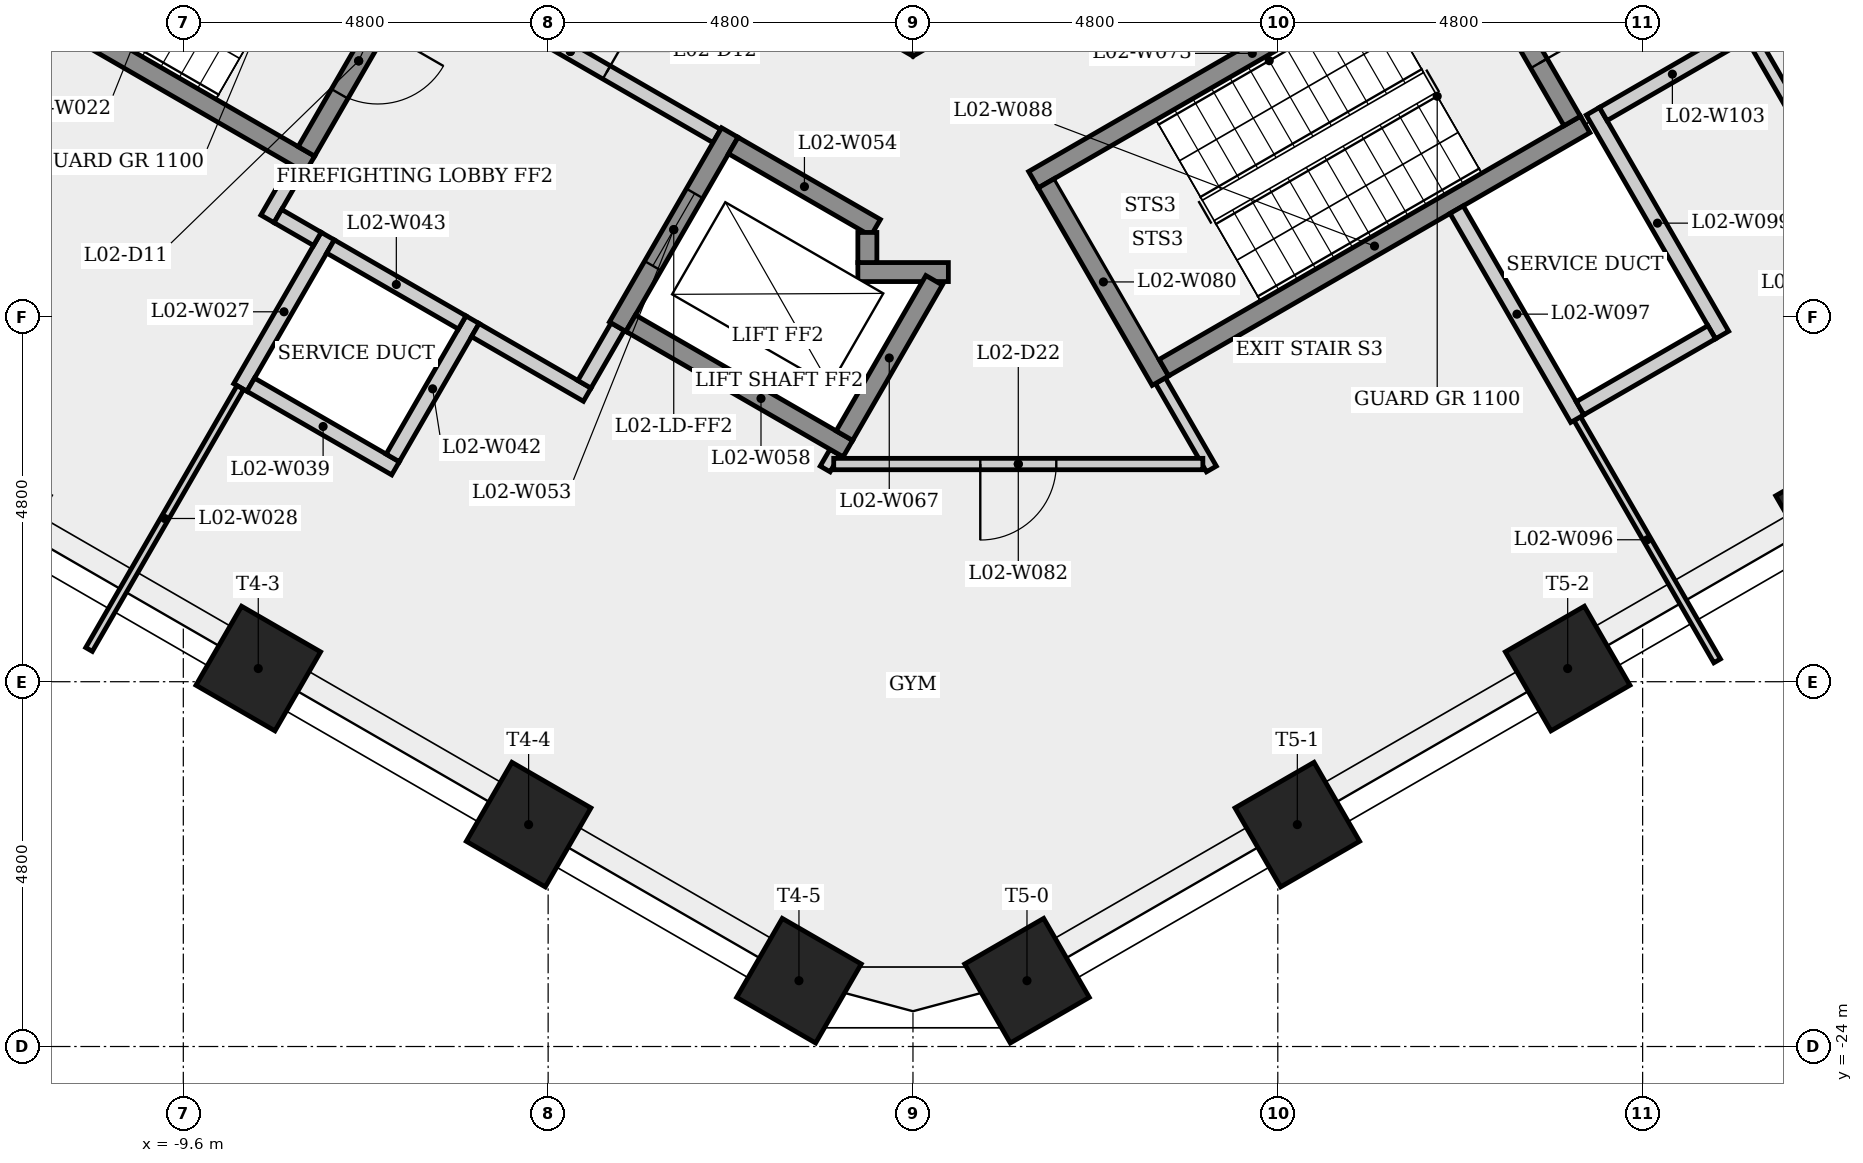
"""IFC4 building model, lengths in metres.
Left out: names, types, materials, properties, quantities, classifications, styles, units other than length and angle.
Written with IfcOpenShell. Run it as: python <this file> out.ifc"""

import sys

from ifc_helpers import new_model, si_unit, direction, frame, frame_2d, origin, origin_2d, place, context, subcontext, project, spatial, rectangle, extrude, element, fill, save


model = new_model("IFC4")
c1 = context("Model", 3, precision=1e-05, world=origin(), true_north=direction((0.0, 1.0)))
c2 = subcontext(c1, "Body", "Model", "MODEL_VIEW")
j1 = project(units=[si_unit("LENGTHUNIT", "METRE"), si_unit("PLANEANGLEUNIT", "RADIAN")], contexts=[c1])
p1 = place(None, origin())
s1 = spatial("IfcSite", under=j1, at=p1, CompositionType="ELEMENT")
p2 = place(p1, origin())
s2 = spatial("IfcBuilding", under=s1, at=p2, CompositionType="ELEMENT")
p3 = place(p2, frame((0.0, 0.0, 11.5)))
s3 = spatial("IfcBuildingStorey", under=s2, at=p3, CompositionType="ELEMENT", Elevation=11.5)
p4 = place(p3, frame((-9.3, -5.138, 0.0), z_axis=(0.0, 0.0, 1.0), x_axis=(0.866023993627, -0.500002442456, 0.0)))
e1 = element("IfcWall", 1, at=p4, inside=s3, PredefinedType="SHEAR", context=c2, shape_type="SweptSolid", body=[
    extrude(rectangle(XDim=10.97, YDim=0.8, at=frame_2d((5.485, 0.0))), origin(), (0.0, 0.0, 1.0), 4.5),
])
p5 = place(p4, frame((5.74, 0.0, 0.0)))
e2 = element("IfcOpeningElement", 2, at=p5, cuts=e1, PredefinedType="OPENING", context=c2, shape_type="SweptSolid", body=[
    extrude(rectangle(XDim=0.9, YDim=2.1, at=frame_2d((0.45, 1.05))), frame((0.0, 0.41, 0.0), z_axis=(0.0, -1.0, 0.0), x_axis=(1.0, 0.0, 0.0)), (0.0, 0.0, 1.0), 0.82),
])
p6 = place(p3, frame((-0.2, -10.623, 0.0), z_axis=(0.0, 0.0, 1.0), x_axis=(0.866023993627, 0.500002442456, 0.0)))
e3 = element("IfcWall", 3, at=p6, inside=s3, PredefinedType="SHEAR", context=c2, shape_type="SweptSolid", body=[
    extrude(rectangle(XDim=10.97, YDim=0.8, at=frame_2d((5.485, 0.0))), origin(), (0.0, 0.0, 1.0), 4.5),
])
p7 = place(p6, frame((7.224, 0.0, 0.0)))
e4 = element("IfcOpeningElement", 4, at=p7, cuts=e3, PredefinedType="OPENING", context=c2, shape_type="SweptSolid", body=[
    extrude(rectangle(XDim=0.9, YDim=2.1, at=frame_2d((0.45, 1.05))), frame((0.0, 0.41, 0.0), z_axis=(0.0, -1.0, 0.0), x_axis=(1.0, 0.0, 0.0)), (0.0, 0.0, 1.0), 0.82),
])
for number, where, z_axis, x_axis in (
    (5, (-8.614, -19.027, 0.0), (0.0, 0.0, 1.0), (-0.5, -0.866, 0.0)),
    (6, (-5.057, -21.08, 0.0), (0.0, 0.0, 1.0), (-0.5, -0.866, 0.0)),
    (7, (-1.5, -23.134, 0.0), (0.0, 0.0, 1.0), (-0.5, -0.866, 0.0)),
    (8, (1.5, -23.134, 0.0), (0.0, 0.0, 1.0), (0.5, -0.866, 0.0)),
    (9, (5.057, -21.08, 0.0), (0.0, 0.0, 1.0), (0.5, -0.866, 0.0)),
    (10, (8.614, -19.027, 0.0), (0.0, 0.0, 1.0), (0.5, -0.866, 0.0)),
    (11, (12.171, -16.973, 0.0), (0.0, 0.0, 1.0), (0.5, -0.866, 0.0)),
):
    element("IfcColumn", number, at=place(p3, frame(where, z_axis=z_axis, x_axis=x_axis)), inside=s3, PredefinedType="COLUMN", context=c2, shape_type="SweptSolid", body=[
        extrude(rectangle(XDim=1.2, YDim=1.2, at=origin_2d()), origin(), (0.0, 0.0, 1.0), 4.5),
    ])
p8 = place(p3, frame((-8.85, -15.329, 0.0), z_axis=(0.0, 0.0, 1.0), x_axis=(0.500077740698, 0.865980515519, 0.0)))
e12 = element("IfcWall", 12, at=p8, inside=s3, PredefinedType="PLUMBINGWALL", context=c2, shape_type="SweptSolid", body=[
    extrude(rectangle(XDim=2.3, YDim=0.2, at=frame_2d((1.15, 0.0))), origin(), (0.0, 0.0, 1.0), 4.1),
])
p9 = place(p3, frame((-8.85, -15.329, 0.0), z_axis=(0.0, 0.0, 1.0), x_axis=(-0.499991453095, -0.866030338286, 0.0)))
e13 = element("IfcWall", 13, at=p9, inside=s3, PredefinedType="PARTITIONING", context=c2, shape_type="SweptSolid", body=[
    extrude(rectangle(XDim=3.98, YDim=0.1, at=frame_2d((1.99, 0.0))), origin(), (0.0, 0.0, 1.0), 4.1),
])
p10 = place(p3, frame((-8.493, -13.11, 0.0), z_axis=(0.0, 0.0, 1.0), x_axis=(0.500067724834, 0.865986299303, 0.0)))
e14 = element("IfcWall", 14, at=p10, inside=s3, PredefinedType="PARTITIONING", context=c2, shape_type="SweptSolid", body=[
    extrude(rectangle(XDim=0.775, YDim=0.2, at=frame_2d((0.388, 0.0))), origin(), (0.0, 0.0, 1.0), 4.1),
])
p11 = place(p3, frame((-7.935, -12.393, 0.0), z_axis=(0.0, 0.0, 1.0), x_axis=(-0.866025499775, 0.499999833739, 0.0)))
e15 = element("IfcWall", 15, at=p11, inside=s3, PredefinedType="SHEAR", context=c2, shape_type="SweptSolid", body=[
    extrude(rectangle(XDim=6.4, YDim=0.25, at=frame_2d((3.2, 0.0))), origin(), (0.0, 0.0, 1.0), 4.1),
])
p12 = place(p3, frame((-7.836, -13.373, 0.0), z_axis=(0.0, 0.0, 1.0), x_axis=(-0.866232998003, 0.499640263761, 0.0)))
e16 = element("IfcWall", 16, at=p12, inside=s3, PredefinedType="PARTITIONING", context=c2, shape_type="SweptSolid", body=[
    extrude(rectangle(XDim=0.6, YDim=0.2, at=frame_2d((0.3, 0.0))), origin(), (0.0, 0.0, 1.0), 4.1),
])
p13 = place(p3, frame((-6.808, -16.392, 0.0), z_axis=(0.0, 0.0, 1.0), x_axis=(-0.866008176907, 0.50002983664, 0.0)))
e17 = element("IfcWall", 17, at=p13, inside=s3, PredefinedType="PLUMBINGWALL", context=c2, shape_type="SweptSolid", body=[
    extrude(rectangle(XDim=2.2, YDim=0.2, at=frame_2d((1.1, 0.0))), origin(), (0.0, 0.0, 1.0), 4.1),
])
p14 = place(p3, frame((-6.605, -9.841, 0.0), z_axis=(0.0, 0.0, 1.0), x_axis=(-0.499996545922, -0.866027397988, 0.0)))
e18 = element("IfcWall", 18, at=p14, inside=s3, PredefinedType="SHEAR", context=c2, shape_type="SweptSolid", body=[
    extrude(rectangle(XDim=2.75, YDim=0.25, at=frame_2d((1.375, 0.0))), origin(), (0.0, 0.0, 1.0), 4.1),
])
p15 = place(p14, frame((0.875, 0.0, 0.0)))
e19 = element("IfcOpeningElement", 19, at=p15, cuts=e18, PredefinedType="OPENING", context=c2, shape_type="SweptSolid", body=[
    extrude(rectangle(XDim=1.0, YDim=2.1, at=frame_2d((0.5, 1.05))), frame((0.0, 0.135, 0.0), z_axis=(0.0, -1.0, 0.0), x_axis=(1.0, 0.0, 0.0)), (0.0, 0.0, 1.0), 0.27),
])
p16 = place(p3, frame((-6.435, -9.795, 0.0), z_axis=(0.0, 0.0, 1.0), x_axis=(0.866012907634, -0.500021643343, 0.0)))
e20 = element("IfcWall", 20, at=p16, inside=s3, PredefinedType="PARTITIONING", context=c2, shape_type="SweptSolid", body=[
    extrude(rectangle(XDim=4.45, YDim=0.2, at=frame_2d((2.225, 0.0))), origin(), (0.0, 0.0, 1.0), 4.1),
])
p17 = place(p16, frame((1.675, 0.0, 0.0)))
e21 = element("IfcOpeningElement", 21, at=p17, cuts=e20, PredefinedType="OPENING", context=c2, shape_type="SweptSolid", body=[
    extrude(rectangle(XDim=1.1, YDim=2.1, at=frame_2d((0.55, 1.05))), frame((0.0, 0.11, 0.0), z_axis=(0.0, -1.0, 0.0), x_axis=(1.0, 0.0, 0.0)), (0.0, 0.0, 1.0), 0.22),
])
p18 = place(p3, frame((-5.795, -14.437, 0.0), z_axis=(0.0, 0.0, 1.0), x_axis=(-0.500027713859, -0.866009402589, 0.0)))
e22 = element("IfcWall", 22, at=p18, inside=s3, PredefinedType="PLUMBINGWALL", context=c2, shape_type="SweptSolid", body=[
    extrude(rectangle(XDim=2.1, YDim=0.2, at=frame_2d((1.05, 0.0))), origin(), (0.0, 0.0, 1.0), 4.1),
])
p19 = place(p3, frame((-5.931, -14.473, 0.0), z_axis=(0.0, 0.0, 1.0), x_axis=(-0.866041268327, 0.499972520799, 0.0)))
e23 = element("IfcWall", 23, at=p19, inside=s3, PredefinedType="PLUMBINGWALL", context=c2, shape_type="SweptSolid", body=[
    extrude(rectangle(XDim=2.0, YDim=0.2, at=frame_2d((1.0, 0.0))), origin(), (0.0, 0.0, 1.0), 4.1),
])
p20 = place(p3, frame((-4.286, -15.423, 0.0), z_axis=(0.0, 0.0, 1.0), x_axis=(-0.866025371046, 0.500000056704, 0.0)))
e24 = element("IfcWall", 24, at=p20, inside=s3, PredefinedType="PARTITIONING", context=c2, shape_type="SweptSolid", body=[
    extrude(rectangle(XDim=1.7, YDim=0.2, at=frame_2d((0.85, 0.0))), origin(), (0.0, 0.0, 1.0), 4.1),
])
p21 = place(p3, frame((-3.885, -14.529, 0.0), z_axis=(0.0, 0.0, 1.0), x_axis=(-0.499859285417, -0.866106630146, 0.0)))
e25 = element("IfcWall", 25, at=p21, inside=s3, PredefinedType="PARTITIONING", context=c2, shape_type="SweptSolid", body=[
    extrude(rectangle(XDim=0.875, YDim=0.2, at=frame_2d((0.438, 0.0))), origin(), (0.0, 0.0, 1.0), 4.1),
])
p22 = place(p3, frame((-2.41, -11.974, 0.0), z_axis=(0.0, 0.0, 1.0), x_axis=(-0.500001826776, -0.866024349092, 0.0)))
e26 = element("IfcWall", 26, at=p22, inside=s3, PredefinedType="SHEAR", context=c2, shape_type="SweptSolid", body=[
    extrude(rectangle(XDim=2.95, YDim=0.25, at=frame_2d((1.475, 0.0))), origin(), (0.0, 0.0, 1.0), 4.1),
])
p23 = place(p22, frame((0.925, 0.0, 0.0)))
e27 = element("IfcOpeningElement", 27, at=p23, cuts=e26, PredefinedType="OPENING", context=c2, shape_type="SweptSolid", body=[
    extrude(rectangle(XDim=1.1, YDim=2.1, at=frame_2d((0.55, 1.05))), frame((0.0, 0.135, 0.0), z_axis=(0.0, -1.0, 0.0), x_axis=(1.0, 0.0, 0.0)), (0.0, 0.0, 1.0), 0.27),
])
p24 = place(p3, frame((-2.364, -12.145, 0.0), z_axis=(0.0, 0.0, 1.0), x_axis=(0.86603892542, -0.499976579108, 0.0)))
e28 = element("IfcWall", 28, at=p24, inside=s3, PredefinedType="SHEAR", context=c2, shape_type="SweptSolid", body=[
    extrude(rectangle(XDim=2.162, YDim=0.25, at=frame_2d((1.081, 0.0))), origin(), (0.0, 0.0, 1.0), 4.1),
])
p25 = place(p3, frame((-1.155, -16.401, 0.0), z_axis=(0.0, 0.0, 1.0), x_axis=(0.500134748329, 0.865947592822, 0.0)))
e29 = element("IfcWall", 29, at=p25, inside=s3, PredefinedType="PARTITIONING", context=c2, shape_type="SweptSolid", body=[
    extrude(rectangle(XDim=0.256, YDim=0.15, at=frame_2d((0.128, 0.0))), origin(), (0.0, 0.0, 1.0), 4.1),
])
p26 = place(p3, frame((-0.856, -16.133, 0.0), z_axis=(0.0, 0.0, 1.0), x_axis=(-0.866021716278, 0.500006386895, 0.0)))
e30 = element("IfcWall", 30, at=p26, inside=s3, PredefinedType="SHEAR", context=c2, shape_type="SweptSolid", body=[
    extrude(rectangle(XDim=3.3, YDim=0.25, at=frame_2d((1.65, 0.0))), origin(), (0.0, 0.0, 1.0), 4.1),
])
p27 = place(p3, frame((-0.725, -13.81, 0.0), z_axis=(0.0, 0.0, 1.0), x_axis=(1.0, 0.0, 0.0)))
e31 = element("IfcWall", 31, at=p27, inside=s3, PredefinedType="SHEAR", context=c2, shape_type="SweptSolid", body=[
    extrude(rectangle(XDim=1.191, YDim=0.25, at=frame_2d((0.595, 0.0))), origin(), (0.0, 0.0, 1.0), 4.1),
])
p28 = place(p3, frame((-0.6, -13.289, 0.0), z_axis=(0.0, 0.0, 1.0), x_axis=(0.0, -1.0, 0.0)))
e32 = element("IfcWall", 32, at=p28, inside=s3, PredefinedType="SHEAR", context=c2, shape_type="SweptSolid", body=[
    extrude(rectangle(XDim=0.396, YDim=0.25, at=frame_2d((0.198, 0.0))), origin(), (0.0, 0.0, 1.0), 4.5),
])
p29 = place(p3, frame((0.278, -13.918, 0.0), z_axis=(0.0, 0.0, 1.0), x_axis=(-0.49998806882, -0.866032292145, 0.0)))
e33 = element("IfcWall", 33, at=p29, inside=s3, PredefinedType="SHEAR", context=c2, shape_type="SweptSolid", body=[
    extrude(rectangle(XDim=2.36, YDim=0.25, at=frame_2d((1.18, 0.0))), origin(), (0.0, 0.0, 1.0), 4.5),
])
p30 = place(p3, frame((1.585, -12.595, 0.0), z_axis=(0.0, 0.0, 1.0), x_axis=(0.866036417653, 0.499980922934, 0.0)))
e34 = element("IfcWall", 34, at=p30, inside=s3, PredefinedType="SHEAR", context=c2, shape_type="SweptSolid", body=[
    extrude(rectangle(XDim=6.65, YDim=0.25, at=frame_2d((3.325, 0.0))), origin(), (0.0, 0.0, 1.0), 4.1),
])
p31 = place(p30, frame((5.275, 0.0, 0.0)))
e35 = element("IfcOpeningElement", 35, at=p31, cuts=e34, PredefinedType="OPENING", context=c2, shape_type="SweptSolid", body=[
    extrude(rectangle(XDim=1.0, YDim=2.1, at=frame_2d((0.5, 1.05))), frame((0.0, 0.135, 0.0), z_axis=(0.0, -1.0, 0.0), x_axis=(1.0, 0.0, 0.0)), (0.0, 0.0, 1.0), 0.27),
])
p32 = place(p3, frame((3.256, -15.239, 0.0), z_axis=(0.0, 0.0, 1.0), x_axis=(0.499974444137, -0.866040157966, 0.0)))
e36 = element("IfcWall", 36, at=p32, inside=s3, PredefinedType="PARTITIONING", context=c2, shape_type="SweptSolid", body=[
    extrude(rectangle(XDim=1.342, YDim=0.15, at=frame_2d((0.671, 0.0))), origin(), (0.0, 0.0, 1.0), 4.1),
])
p33 = place(p3, frame((3.256, -15.239, 0.0), z_axis=(0.0, 0.0, 1.0), x_axis=(-0.50002537861, 0.866010750942, 0.0)))
e37 = element("IfcWall", 37, at=p33, inside=s3, PredefinedType="SHEAR", context=c2, shape_type="SweptSolid", body=[
    extrude(rectangle(XDim=3.0, YDim=0.25, at=frame_2d((1.5, 0.0))), origin(), (0.0, 0.0, 1.0), 4.1),
])
p34 = place(p3, frame((3.814, -16.336, 0.0), z_axis=(0.0, 0.0, 1.0), x_axis=(-1.0, 0.0, 0.0)))
e38 = element("IfcWall", 38, at=p34, inside=s3, PredefinedType="PARTITIONING", context=c2, shape_type="SweptSolid", body=[
    extrude(rectangle(XDim=4.857, YDim=0.15, at=frame_2d((2.428, 0.0))), origin(), (0.0, 0.0, 1.0), 4.1),
])
p35 = place(p34, frame((1.928, 0.0, 0.0)))
e39 = element("IfcOpeningElement", 39, at=p35, cuts=e38, PredefinedType="OPENING", context=c2, shape_type="SweptSolid", body=[
    extrude(rectangle(XDim=1.0, YDim=2.1, at=frame_2d((0.5, 1.05))), frame((0.0, 0.085, 0.0), z_axis=(0.0, -1.0, 0.0), x_axis=(1.0, 0.0, 0.0)), (0.0, 0.0, 1.0), 0.17),
])
p36 = place(p3, frame((3.301, -15.068, 0.0), z_axis=(0.0, 0.0, 1.0), x_axis=(0.866035036182, 0.499983315828, 0.0)))
e40 = element("IfcWall", 40, at=p36, inside=s3, PredefinedType="SHEAR", context=c2, shape_type="SweptSolid", body=[
    extrude(rectangle(XDim=6.4, YDim=0.25, at=frame_2d((3.2, 0.0))), origin(), (0.0, 0.0, 1.0), 4.1),
])
p37 = place(p3, frame((7.298, -9.441, 0.0), z_axis=(0.0, 0.0, 1.0), x_axis=(0.500034990121, -0.866005201286, 0.0)))
e41 = element("IfcWall", 41, at=p37, inside=s3, PredefinedType="SHEAR", context=c2, shape_type="SweptSolid", body=[
    extrude(rectangle(XDim=2.75, YDim=0.25, at=frame_2d((1.375, 0.0))), origin(), (0.0, 0.0, 1.0), 4.1),
])
p38 = place(p37, frame((0.875, 0.0, 0.0)))
e42 = element("IfcOpeningElement", 42, at=p38, cuts=e41, PredefinedType="OPENING", context=c2, shape_type="SweptSolid", body=[
    extrude(rectangle(XDim=1.0, YDim=2.1, at=frame_2d((0.5, 1.05))), frame((0.0, 0.135, 0.0), z_axis=(0.0, -1.0, 0.0), x_axis=(1.0, 0.0, 0.0)), (0.0, 0.0, 1.0), 0.27),
])
p39 = place(p3, frame((8.74, -15.738, 0.0), z_axis=(0.0, 0.0, 1.0), x_axis=(0.500026738915, -0.866009965514, 0.0)))
e43 = element("IfcWall", 43, at=p39, inside=s3, PredefinedType="PARTITIONING", context=c2, shape_type="SweptSolid", body=[
    extrude(rectangle(XDim=3.681, YDim=0.1, at=frame_2d((1.84, 0.0))), origin(), (0.0, 0.0, 1.0), 4.1),
])
p40 = place(p3, frame((8.74, -15.739, 0.0), z_axis=(0.0, 0.0, 1.0), x_axis=(-0.500017526161, 0.866015284814, 0.0)))
e44 = element("IfcWall", 44, at=p40, inside=s3, PredefinedType="PLUMBINGWALL", context=c2, shape_type="SweptSolid", body=[
    extrude(rectangle(XDim=3.175, YDim=0.2, at=frame_2d((1.588, 0.0))), origin(), (0.0, 0.0, 1.0), 4.1),
])
p41 = place(p3, frame((8.945, -11.694, 0.0), z_axis=(0.0, 0.0, 1.0), x_axis=(0.500062241894, -0.865989465428, 0.0)))
e45 = element("IfcWall", 45, at=p41, inside=s3, PredefinedType="PLUMBINGWALL", context=c2, shape_type="SweptSolid", body=[
    extrude(rectangle(XDim=3.4, YDim=0.2, at=frame_2d((1.7, 0.0))), origin(), (0.0, 0.0, 1.0), 4.1),
])
p42 = place(p3, frame((10.509, -14.602, 0.0), z_axis=(0.0, 0.0, 1.0), x_axis=(-0.866010750942, -0.50002537861, 0.0)))
e46 = element("IfcWall", 46, at=p42, inside=s3, PredefinedType="PLUMBINGWALL", context=c2, shape_type="SweptSolid", body=[
    extrude(rectangle(XDim=2.0, YDim=0.2, at=frame_2d((1.0, 0.0))), origin(), (0.0, 0.0, 1.0), 4.1),
])
p43 = place(p3, frame((10.901, -10.681, 0.0), z_axis=(0.0, 0.0, 1.0), x_axis=(-0.866009402589, -0.500027713859, 0.0)))
e47 = element("IfcWall", 47, at=p43, inside=s3, PredefinedType="PARTITIONING", context=c2, shape_type="SweptSolid", body=[
    extrude(rectangle(XDim=2.1, YDim=0.2, at=frame_2d((1.05, 0.0))), origin(), (0.0, 0.0, 1.0), 4.1),
])
p44 = place(p3, frame((12.587, -13.401, 0.0), z_axis=(0.0, 0.0, 1.0), x_axis=(-0.499952049853, 0.866053086045, 0.0)))
e48 = element("IfcWall", 48, at=p44, inside=s3, PredefinedType="PARTITIONING", context=c2, shape_type="SweptSolid", body=[
    extrude(rectangle(XDim=3.099, YDim=0.15, at=frame_2d((1.549, 0.0))), origin(), (0.0, 0.0, 1.0), 4.1),
])
p45 = place(p15, origin())
e49 = element("IfcDoor", 49, at=p45, inside=s3, OperationType="SINGLE_SWING_LEFT", PredefinedType="DOOR", context=c2, shape_type="SweptSolid", body=[
    extrude(rectangle(XDim=1.0, YDim=2.1, at=frame_2d((0.5, 1.05))), frame((0.0, 0.025, 0.0), z_axis=(0.0, -1.0, 0.0), x_axis=(1.0, 0.0, 0.0)), (0.0, 0.0, 1.0), 0.05),
])
fill(e19, e49)
p46 = place(p17, origin())
e50 = element("IfcDoor", 50, at=p46, inside=s3, OperationType="SINGLE_SWING_RIGHT", PredefinedType="DOOR", context=c2, shape_type="SweptSolid", body=[
    extrude(rectangle(XDim=1.1, YDim=2.1, at=frame_2d((0.55, 1.05))), frame((0.0, 0.025, 0.0), z_axis=(0.0, -1.0, 0.0), x_axis=(1.0, 0.0, 0.0)), (0.0, 0.0, 1.0), 0.05),
])
fill(e21, e50)
p47 = place(p23, origin())
e51 = element("IfcDoor", 51, at=p47, inside=s3, OperationType="SLIDING_TO_LEFT", PredefinedType="DOOR", context=c2, shape_type="SweptSolid", body=[
    extrude(rectangle(XDim=1.1, YDim=2.1, at=frame_2d((0.55, 1.05))), frame((0.0, 0.025, 0.0), z_axis=(0.0, -1.0, 0.0), x_axis=(1.0, 0.0, 0.0)), (0.0, 0.0, 1.0), 0.05),
])
fill(e27, e51)
p48 = place(p38, origin())
e52 = element("IfcDoor", 52, at=p48, inside=s3, OperationType="SINGLE_SWING_RIGHT", PredefinedType="DOOR", context=c2, shape_type="SweptSolid", body=[
    extrude(rectangle(XDim=1.0, YDim=2.1, at=frame_2d((0.5, 1.05))), frame((0.0, 0.025, 0.0), z_axis=(0.0, -1.0, 0.0), x_axis=(1.0, 0.0, 0.0)), (0.0, 0.0, 1.0), 0.05),
])
fill(e42, e52)
p49 = place(p35, origin())
e53 = element("IfcDoor", 53, at=p49, inside=s3, OperationType="SINGLE_SWING_RIGHT", PredefinedType="DOOR", context=c2, shape_type="SweptSolid", body=[
    extrude(rectangle(XDim=1.0, YDim=2.1, at=frame_2d((0.5, 1.05))), frame((0.0, 0.025, 0.0), z_axis=(0.0, -1.0, 0.0), x_axis=(1.0, 0.0, 0.0)), (0.0, 0.0, 1.0), 0.05),
])
fill(e39, e53)
save(model, sys.argv[1])
